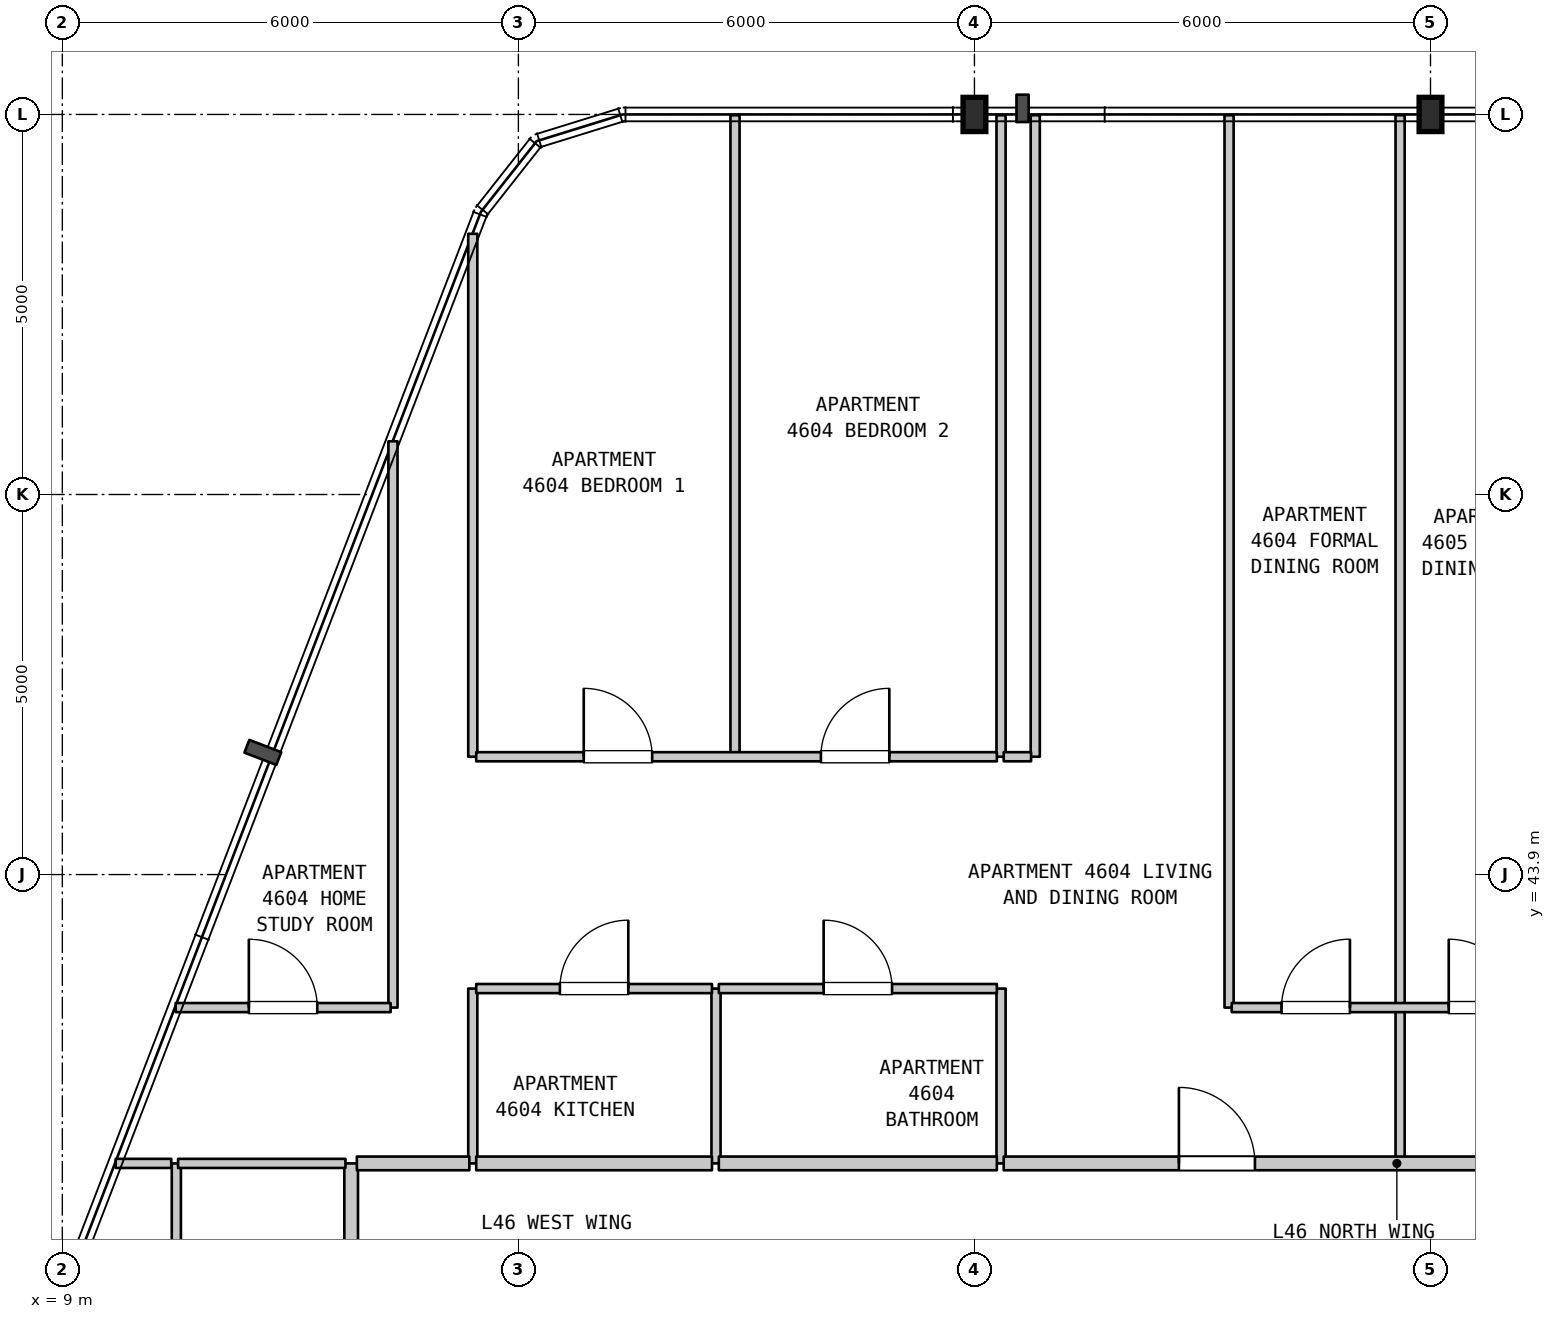
"""IFC4 building model, lengths in metres.
Left out: names, types, materials, properties, quantities, classifications, styles, units other than length and angle.
Written with IfcOpenShell. Run it as: python <this file> out.ifc"""

import sys

from ifc_helpers import new_model, si_unit, direction, frame, frame_2d, origin, origin_2d, place, context, subcontext, project, spatial, rectangle, i_section, extrude, element, fill, save


model = new_model("IFC4")
c1 = context("Model", 3, precision=1e-05, world=origin(), true_north=direction((0.0, 1.0)))
c2 = subcontext(c1, "Body", "Model", "MODEL_VIEW")
j1 = project(units=[si_unit("LENGTHUNIT", "METRE"), si_unit("PLANEANGLEUNIT", "RADIAN")], contexts=[c1])
p1 = place(None, origin())
s1 = spatial("IfcSite", under=j1, at=p1, CompositionType="ELEMENT")
p2 = place(p1, origin())
s2 = spatial("IfcBuilding", under=s1, at=p2, CompositionType="ELEMENT")
p3 = place(p2, frame((0.0, 0.0, 188.4)))
s3 = spatial("IfcBuildingStorey", under=s2, at=p3, CompositionType="ELEMENT", Elevation=188.4)
for number, where, z_axis, x_axis in (
    (1, (21.0, 53.9, 0.0), (0.0, 0.0, 1.0), (1.0, 0.0, 0.0)),
    (2, (27.0, 53.9, 0.0), (0.0, 0.0, 1.0), (1.0, 0.0, 0.0)),
):
    element("IfcColumn", number, at=place(p3, frame(where, z_axis=z_axis, x_axis=x_axis)), inside=s3, PredefinedType="COLUMN", context=c2, shape_type="SweptSolid", body=[
        extrude(i_section(OverallWidth=0.3, OverallDepth=0.45, WebThickness=0.014, FlangeThickness=0.026, FilletRadius=0.027, at=origin_2d()), origin(), (0.0, 0.0, 1.0), 3.7),
    ])
p4 = place(p3, frame((10.5, 31.45, 0.0), z_axis=(0.0, 0.0, 1.0), x_axis=(0.0, 1.0, 0.0)))
e3 = element("IfcWall", 3, at=p4, inside=s3, PredefinedType="PARTITIONING", context=c2, shape_type="SweptSolid", body=[
    extrude(rectangle(XDim=8.65, YDim=0.12, at=frame_2d((4.325, 0.0))), origin(), (0.0, 0.0, 1.0), 3.39),
])
p5 = place(p3, frame((12.8, 31.45, 0.0), z_axis=(0.0, 0.0, 1.0), x_axis=(0.0, 1.0, 0.0)))
e4 = element("IfcWall", 4, at=p5, inside=s3, PredefinedType="STANDARD", context=c2, shape_type="SweptSolid", body=[
    extrude(rectangle(XDim=8.65, YDim=0.18, at=frame_2d((4.325, 0.0))), origin(), (0.0, 0.0, 1.0), 3.39),
])
p6 = place(p3, frame((13.35, 42.15, 0.0), z_axis=(0.0, 0.0, 1.0), x_axis=(0.0, 1.0, 0.0)))
e5 = element("IfcWall", 5, at=p6, inside=s3, PredefinedType="PARTITIONING", context=c2, shape_type="SweptSolid", body=[
    extrude(rectangle(XDim=7.45, YDim=0.12, at=frame_2d((3.725, 0.0))), origin(), (0.0, 0.0, 1.0), 3.39),
])
p7 = place(p3, frame((14.4, 40.1, 0.0), z_axis=(0.0, 0.0, 1.0), x_axis=(0.0, 1.0, 0.0)))
e6 = element("IfcWall", 6, at=p7, inside=s3, PredefinedType="PARTITIONING", context=c2, shape_type="SweptSolid", body=[
    extrude(rectangle(XDim=2.3, YDim=0.12, at=frame_2d((1.15, 0.0))), origin(), (0.0, 0.0, 1.0), 3.39),
])
p8 = place(p3, frame((14.4, 45.45, 0.0), z_axis=(0.0, 0.0, 1.0), x_axis=(0.0, 1.0, 0.0)))
e7 = element("IfcWall", 7, at=p8, inside=s3, PredefinedType="PARTITIONING", context=c2, shape_type="SweptSolid", body=[
    extrude(rectangle(XDim=6.88, YDim=0.12, at=frame_2d((3.44, 0.0))), origin(), (0.0, 0.0, 1.0), 3.39),
])
p9 = place(p3, frame((17.6, 40.1, 0.0), z_axis=(0.0, 0.0, 1.0), x_axis=(0.0, 1.0, 0.0)))
e8 = element("IfcWall", 8, at=p9, inside=s3, PredefinedType="PARTITIONING", context=c2, shape_type="SweptSolid", body=[
    extrude(rectangle(XDim=2.3, YDim=0.12, at=frame_2d((1.15, 0.0))), origin(), (0.0, 0.0, 1.0), 3.39),
])
p10 = place(p3, frame((17.85, 45.45, 0.0), z_axis=(0.0, 0.0, 1.0), x_axis=(0.0, 1.0, 0.0)))
e9 = element("IfcWall", 9, at=p10, inside=s3, PredefinedType="PARTITIONING", context=c2, shape_type="SweptSolid", body=[
    extrude(rectangle(XDim=8.44, YDim=0.12, at=frame_2d((4.22, 0.0))), origin(), (0.0, 0.0, 1.0), 3.39),
])
p11 = place(p3, frame((21.35, 40.1, 0.0), z_axis=(0.0, 0.0, 1.0), x_axis=(0.0, 1.0, 0.0)))
e10 = element("IfcWall", 10, at=p11, inside=s3, PredefinedType="PARTITIONING", context=c2, shape_type="SweptSolid", body=[
    extrude(rectangle(XDim=2.3, YDim=0.12, at=frame_2d((1.15, 0.0))), origin(), (0.0, 0.0, 1.0), 3.39),
])
for number, where, z_axis, x_axis in (
    (11, (21.35, 45.45, 0.0), (0.0, 0.0, 1.0), (0.0, 1.0, 0.0)),
    (12, (21.8, 45.45, 0.0), (0.0, 0.0, 1.0), (0.0, 1.0, 0.0)),
):
    element("IfcWall", number, at=place(p3, frame(where, z_axis=z_axis, x_axis=x_axis)), inside=s3, PredefinedType="PARTITIONING", context=c2, shape_type="SweptSolid", body=[
        extrude(rectangle(XDim=8.44, YDim=0.12, at=frame_2d((4.22, 0.0))), origin(), (0.0, 0.0, 1.0), 3.39),
    ])
p12 = place(p3, frame((24.35, 42.15, 0.0), z_axis=(0.0, 0.0, 1.0), x_axis=(0.0, 1.0, 0.0)))
e13 = element("IfcWall", 13, at=p12, inside=s3, PredefinedType="PARTITIONING", context=c2, shape_type="SweptSolid", body=[
    extrude(rectangle(XDim=11.74, YDim=0.12, at=frame_2d((5.87, 0.0))), origin(), (0.0, 0.0, 1.0), 3.39),
])
p13 = place(p3, frame((26.6, 40.1, 0.0), z_axis=(0.0, 0.0, 1.0), x_axis=(0.0, 1.0, 0.0)))
e14 = element("IfcWall", 14, at=p13, inside=s3, PredefinedType="PARTITIONING", context=c2, shape_type="SweptSolid", body=[
    extrude(rectangle(XDim=2.05, YDim=0.12, at=frame_2d((1.025, 0.0))), origin(), (0.0, 0.0, 1.0), 3.39),
])
p14 = place(p3, frame((26.6, 42.15, 0.0), z_axis=(0.0, 0.0, 1.0), x_axis=(0.0, 1.0, 0.0)))
e15 = element("IfcWall", 15, at=p14, inside=s3, PredefinedType="PARTITIONING", context=c2, shape_type="SweptSolid", body=[
    extrude(rectangle(XDim=11.74, YDim=0.12, at=frame_2d((5.87, 0.0))), origin(), (0.0, 0.0, 1.0), 3.39),
])
p15 = place(p3, frame((9.702, 40.1, 0.0), z_axis=(0.0, 0.0, 1.0), x_axis=(1.0, 0.0, 0.0)))
e16 = element("IfcWall", 16, at=p15, inside=s3, PredefinedType="PARTITIONING", context=c2, shape_type="SweptSolid", body=[
    extrude(rectangle(XDim=0.731, YDim=0.12, at=frame_2d((0.366, 0.0))), origin(), (0.0, 0.0, 1.0), 3.39),
])
p16 = place(p3, frame((10.523, 40.1, 0.0), z_axis=(0.0, 0.0, 1.0), x_axis=(1.0, 0.0, 0.0)))
e17 = element("IfcWall", 17, at=p16, inside=s3, PredefinedType="PARTITIONING", context=c2, shape_type="SweptSolid", body=[
    extrude(rectangle(XDim=2.202, YDim=0.12, at=frame_2d((1.101, 0.0))), origin(), (0.0, 0.0, 1.0), 3.39),
])
p17 = place(p3, frame((12.875, 40.1, 0.0), z_axis=(0.0, 0.0, 1.0), x_axis=(1.0, 0.0, 0.0)))
e18 = element("IfcWall", 18, at=p17, inside=s3, PredefinedType="STANDARD", context=c2, shape_type="SweptSolid", body=[
    extrude(rectangle(XDim=1.48, YDim=0.18, at=frame_2d((0.74, 0.0))), origin(), (0.0, 0.0, 1.0), 3.39),
])
p18 = place(p3, frame((14.445, 40.1, 0.0), z_axis=(0.0, 0.0, 1.0), x_axis=(1.0, 0.0, 0.0)))
e19 = element("IfcWall", 19, at=p18, inside=s3, PredefinedType="STANDARD", context=c2, shape_type="SweptSolid", body=[
    extrude(rectangle(XDim=3.102, YDim=0.18, at=frame_2d((1.551, 0.0))), origin(), (0.0, 0.0, 1.0), 3.39),
])
p19 = place(p3, frame((17.637, 40.1, 0.0), z_axis=(0.0, 0.0, 1.0), x_axis=(1.0, 0.0, 0.0)))
e20 = element("IfcWall", 20, at=p19, inside=s3, PredefinedType="STANDARD", context=c2, shape_type="SweptSolid", body=[
    extrude(rectangle(XDim=3.658, YDim=0.18, at=frame_2d((1.829, 0.0))), origin(), (0.0, 0.0, 1.0), 3.39),
])
p20 = place(p3, frame((21.385, 40.1, 0.0), z_axis=(0.0, 0.0, 1.0), x_axis=(1.0, 0.0, 0.0)))
e21 = element("IfcWall", 21, at=p20, inside=s3, PredefinedType="STANDARD", context=c2, shape_type="SweptSolid", body=[
    extrude(rectangle(XDim=10.345, YDim=0.18, at=frame_2d((5.172, 0.0))), origin(), (0.0, 0.0, 1.0), 3.39),
])
p21 = place(p20, frame((2.305, 0.0, 0.0)))
e22 = element("IfcOpeningElement", 22, at=p21, cuts=e21, PredefinedType="OPENING", context=c2, shape_type="SweptSolid", body=[
    extrude(rectangle(XDim=1.0, YDim=2.15, at=frame_2d((0.5, 1.075))), frame((0.0, 0.1, 0.0), z_axis=(0.0, -1.0, 0.0), x_axis=(1.0, 0.0, 0.0)), (0.0, 0.0, 1.0), 0.2),
])
p22 = place(p20, frame((7.235, 0.0, 0.0)))
e23 = element("IfcOpeningElement", 23, at=p22, cuts=e21, PredefinedType="OPENING", context=c2, shape_type="SweptSolid", body=[
    extrude(rectangle(XDim=1.0, YDim=2.15, at=frame_2d((0.5, 1.075))), frame((0.0, 0.1, 0.0), z_axis=(0.0, -1.0, 0.0), x_axis=(1.0, 0.0, 0.0)), (0.0, 0.0, 1.0), 0.2),
])
p23 = place(p3, frame((10.491, 42.15, 0.0), z_axis=(0.0, 0.0, 1.0), x_axis=(1.0, 0.0, 0.0)))
e24 = element("IfcWall", 24, at=p23, inside=s3, PredefinedType="PARTITIONING", context=c2, shape_type="SweptSolid", body=[
    extrude(rectangle(XDim=2.828, YDim=0.12, at=frame_2d((1.414, 0.0))), origin(), (0.0, 0.0, 1.0), 3.39),
])
p24 = place(p23, frame((0.963, 0.0, 0.0)))
e25 = element("IfcOpeningElement", 25, at=p24, cuts=e24, PredefinedType="OPENING", context=c2, shape_type="SweptSolid", body=[
    extrude(rectangle(XDim=0.9, YDim=2.15, at=frame_2d((0.45, 1.075))), frame((0.0, 0.07, 0.0), z_axis=(0.0, -1.0, 0.0), x_axis=(1.0, 0.0, 0.0)), (0.0, 0.0, 1.0), 0.14),
])
p25 = place(p3, frame((24.385, 42.15, 0.0), z_axis=(0.0, 0.0, 1.0), x_axis=(1.0, 0.0, 0.0)))
e26 = element("IfcWall", 26, at=p25, inside=s3, PredefinedType="PARTITIONING", context=c2, shape_type="SweptSolid", body=[
    extrude(rectangle(XDim=4.41, YDim=0.12, at=frame_2d((2.205, 0.0))), origin(), (0.0, 0.0, 1.0), 3.39),
])
p26 = place(p25, frame((0.655, 0.0, 0.0)))
e27 = element("IfcOpeningElement", 27, at=p26, cuts=e26, PredefinedType="OPENING", context=c2, shape_type="SweptSolid", body=[
    extrude(rectangle(XDim=0.9, YDim=2.15, at=frame_2d((0.45, 1.075))), frame((0.0, 0.07, 0.0), z_axis=(0.0, -1.0, 0.0), x_axis=(1.0, 0.0, 0.0)), (0.0, 0.0, 1.0), 0.14),
])
p27 = place(p25, frame((2.855, 0.0, 0.0)))
e28 = element("IfcOpeningElement", 28, at=p27, cuts=e26, PredefinedType="OPENING", context=c2, shape_type="SweptSolid", body=[
    extrude(rectangle(XDim=0.9, YDim=2.15, at=frame_2d((0.45, 1.075))), frame((0.0, 0.07, 0.0), z_axis=(0.0, -1.0, 0.0), x_axis=(1.0, 0.0, 0.0)), (0.0, 0.0, 1.0), 0.14),
])
p28 = place(p3, frame((14.445, 42.4, 0.0), z_axis=(0.0, 0.0, 1.0), x_axis=(1.0, 0.0, 0.0)))
e29 = element("IfcWall", 29, at=p28, inside=s3, PredefinedType="PARTITIONING", context=c2, shape_type="SweptSolid", body=[
    extrude(rectangle(XDim=3.102, YDim=0.12, at=frame_2d((1.551, 0.0))), origin(), (0.0, 0.0, 1.0), 3.39),
])
p29 = place(p28, frame((1.101, 0.0, 0.0)))
e30 = element("IfcOpeningElement", 30, at=p29, cuts=e29, PredefinedType="OPENING", context=c2, shape_type="SweptSolid", body=[
    extrude(rectangle(XDim=0.9, YDim=2.15, at=frame_2d((0.45, 1.075))), frame((0.0, 0.07, 0.0), z_axis=(0.0, -1.0, 0.0), x_axis=(1.0, 0.0, 0.0)), (0.0, 0.0, 1.0), 0.14),
])
p30 = place(p3, frame((17.637, 42.4, 0.0), z_axis=(0.0, 0.0, 1.0), x_axis=(1.0, 0.0, 0.0)))
e31 = element("IfcWall", 31, at=p30, inside=s3, PredefinedType="PARTITIONING", context=c2, shape_type="SweptSolid", body=[
    extrude(rectangle(XDim=3.658, YDim=0.12, at=frame_2d((1.829, 0.0))), origin(), (0.0, 0.0, 1.0), 3.39),
])
p31 = place(p30, frame((1.379, 0.0, 0.0)))
e32 = element("IfcOpeningElement", 32, at=p31, cuts=e31, PredefinedType="OPENING", context=c2, shape_type="SweptSolid", body=[
    extrude(rectangle(XDim=0.9, YDim=2.1, at=frame_2d((0.45, 1.05))), frame((0.0, 0.07, 0.0), z_axis=(0.0, -1.0, 0.0), x_axis=(1.0, 0.0, 0.0)), (0.0, 0.0, 1.0), 0.14),
])
p32 = place(p3, frame((14.445, 45.45, 0.0), z_axis=(0.0, 0.0, 1.0), x_axis=(1.0, 0.0, 0.0)))
e33 = element("IfcWall", 33, at=p32, inside=s3, PredefinedType="PARTITIONING", context=c2, shape_type="SweptSolid", body=[
    extrude(rectangle(XDim=6.85, YDim=0.12, at=frame_2d((3.425, 0.0))), origin(), (0.0, 0.0, 1.0), 3.39),
])
p33 = place(p32, frame((1.415, 0.0, 0.0)))
e34 = element("IfcOpeningElement", 34, at=p33, cuts=e33, PredefinedType="OPENING", context=c2, shape_type="SweptSolid", body=[
    extrude(rectangle(XDim=0.9, YDim=2.15, at=frame_2d((0.45, 1.075))), frame((0.0, 0.07, 0.0), z_axis=(0.0, -1.0, 0.0), x_axis=(1.0, 0.0, 0.0)), (0.0, 0.0, 1.0), 0.14),
])
p34 = place(p32, frame((4.535, 0.0, 0.0)))
e35 = element("IfcOpeningElement", 35, at=p34, cuts=e33, PredefinedType="OPENING", context=c2, shape_type="SweptSolid", body=[
    extrude(rectangle(XDim=0.9, YDim=2.15, at=frame_2d((0.45, 1.075))), frame((0.0, 0.07, 0.0), z_axis=(0.0, -1.0, 0.0), x_axis=(1.0, 0.0, 0.0)), (0.0, 0.0, 1.0), 0.14),
])
p35 = place(p3, frame((21.385, 45.45, 0.0), z_axis=(0.0, 0.0, 1.0), x_axis=(1.0, 0.0, 0.0)))
e36 = element("IfcWall", 36, at=p35, inside=s3, PredefinedType="PARTITIONING", context=c2, shape_type="SweptSolid", body=[
    extrude(rectangle(XDim=0.36, YDim=0.12, at=frame_2d((0.18, 0.0))), origin(), (0.0, 0.0, 1.0), 3.39),
])
p36 = place(p21, origin())
e37 = element("IfcDoor", 37, at=p36, inside=s3, OperationType="SINGLE_SWING_LEFT", PredefinedType="DOOR", context=c2, shape_type="SweptSolid", body=[
    extrude(rectangle(XDim=1.0, YDim=2.15, at=frame_2d((0.5, 1.075))), frame((0.0, 0.025, 0.0), z_axis=(0.0, -1.0, 0.0), x_axis=(1.0, 0.0, 0.0)), (0.0, 0.0, 1.0), 0.05),
])
fill(e22, e37)
p37 = place(p24, origin())
e38 = element("IfcDoor", 38, at=p37, inside=s3, OperationType="SINGLE_SWING_LEFT", PredefinedType="DOOR", context=c2, shape_type="SweptSolid", body=[
    extrude(rectangle(XDim=0.9, YDim=2.15, at=frame_2d((0.45, 1.075))), frame((0.0, 0.025, 0.0), z_axis=(0.0, -1.0, 0.0), x_axis=(1.0, 0.0, 0.0)), (0.0, 0.0, 1.0), 0.05),
])
fill(e25, e38)
p38 = place(p26, origin())
e39 = element("IfcDoor", 39, at=p38, inside=s3, OperationType="SINGLE_SWING_RIGHT", PredefinedType="DOOR", context=c2, shape_type="SweptSolid", body=[
    extrude(rectangle(XDim=0.9, YDim=2.15, at=frame_2d((0.45, 1.075))), frame((0.0, 0.025, 0.0), z_axis=(0.0, -1.0, 0.0), x_axis=(1.0, 0.0, 0.0)), (0.0, 0.0, 1.0), 0.05),
])
fill(e27, e39)
p39 = place(p27, origin())
e40 = element("IfcDoor", 40, at=p39, inside=s3, OperationType="SINGLE_SWING_LEFT", PredefinedType="DOOR", context=c2, shape_type="SweptSolid", body=[
    extrude(rectangle(XDim=0.9, YDim=2.15, at=frame_2d((0.45, 1.075))), frame((0.0, 0.025, 0.0), z_axis=(0.0, -1.0, 0.0), x_axis=(1.0, 0.0, 0.0)), (0.0, 0.0, 1.0), 0.05),
])
fill(e28, e40)
p40 = place(p29, origin())
e41 = element("IfcDoor", 41, at=p40, inside=s3, OperationType="SINGLE_SWING_RIGHT", PredefinedType="DOOR", context=c2, shape_type="SweptSolid", body=[
    extrude(rectangle(XDim=0.9, YDim=2.15, at=frame_2d((0.45, 1.075))), frame((0.0, 0.025, 0.0), z_axis=(0.0, -1.0, 0.0), x_axis=(1.0, 0.0, 0.0)), (0.0, 0.0, 1.0), 0.05),
])
fill(e30, e41)
p41 = place(p31, origin())
e42 = element("IfcDoor", 42, at=p41, inside=s3, OperationType="SINGLE_SWING_LEFT", PredefinedType="DOOR", context=c2, shape_type="SweptSolid", body=[
    extrude(rectangle(XDim=0.9, YDim=2.1, at=frame_2d((0.45, 1.05))), frame((0.0, 0.025, 0.0), z_axis=(0.0, -1.0, 0.0), x_axis=(1.0, 0.0, 0.0)), (0.0, 0.0, 1.0), 0.05),
])
fill(e32, e42)
p42 = place(p33, origin())
e43 = element("IfcDoor", 43, at=p42, inside=s3, OperationType="SINGLE_SWING_LEFT", PredefinedType="DOOR", context=c2, shape_type="SweptSolid", body=[
    extrude(rectangle(XDim=0.9, YDim=2.15, at=frame_2d((0.45, 1.075))), frame((0.0, 0.025, 0.0), z_axis=(0.0, -1.0, 0.0), x_axis=(1.0, 0.0, 0.0)), (0.0, 0.0, 1.0), 0.05),
])
fill(e34, e43)
p43 = place(p34, origin())
e44 = element("IfcDoor", 44, at=p43, inside=s3, OperationType="SINGLE_SWING_RIGHT", PredefinedType="DOOR", context=c2, shape_type="SweptSolid", body=[
    extrude(rectangle(XDim=0.9, YDim=2.15, at=frame_2d((0.45, 1.075))), frame((0.0, 0.025, 0.0), z_axis=(0.0, -1.0, 0.0), x_axis=(1.0, 0.0, 0.0)), (0.0, 0.0, 1.0), 0.05),
])
fill(e35, e44)
save(model, sys.argv[1])
